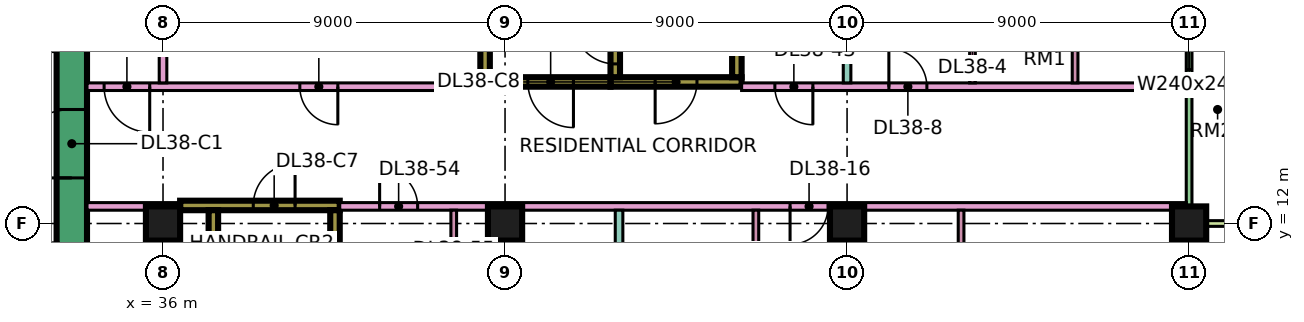
"""IFC4 building model, lengths in metres.
Left out: names, types, materials, properties, quantities, classifications, styles, units other than length and angle.
Written with IfcOpenShell. Run it as: python <this file> out.ifc"""

import sys

from ifc_helpers import new_model, si_unit, direction, frame, frame_2d, origin, origin_2d, place, context, subcontext, project, spatial, rectangle, extrude, element, fill, save


model = new_model("IFC4")
c1 = context("Model", 3, precision=1e-05, world=origin(), true_north=direction((0.0, 1.0)))
c2 = subcontext(c1, "Body", "Model", "MODEL_VIEW")
j1 = project(units=[si_unit("LENGTHUNIT", "METRE"), si_unit("PLANEANGLEUNIT", "RADIAN")], contexts=[c1])
p1 = place(None, origin())
s1 = spatial("IfcSite", under=j1, at=p1, CompositionType="ELEMENT")
p2 = place(p1, origin())
s2 = spatial("IfcBuilding", under=s1, at=p2, CompositionType="ELEMENT")
p3 = place(p2, frame((0.0, 0.0, 168.65)))
s3 = spatial("IfcBuildingStorey", under=s2, at=p3, CompositionType="ELEMENT", Elevation=168.65)
for number, where, z_axis, x_axis in (
    (1, (36.0, 12.0, 0.0), (0.0, 0.0, 1.0), (1.0, 0.0, 0.0)),
    (2, (45.0, 12.0, 0.0), (0.0, 0.0, 1.0), (1.0, 0.0, 0.0)),
    (3, (54.0, 12.0, 0.0), (0.0, 0.0, 1.0), (1.0, 0.0, 0.0)),
    (4, (63.0, 12.0, 0.0), (0.0, 0.0, 1.0), (1.0, 0.0, 0.0)),
):
    element("IfcColumn", number, at=place(p3, frame(where, z_axis=z_axis, x_axis=x_axis)), inside=s3, PredefinedType="COLUMN", context=c2, shape_type="SweptSolid", body=[
        extrude(rectangle(XDim=0.9, YDim=0.9, at=origin_2d()), origin(), (0.0, 0.0, 1.0), 3.75),
    ])
p4 = place(p3, frame((33.6, 7.8, 0.0), z_axis=(0.0, 0.0, 1.0), x_axis=(0.0, 1.0, 0.0)))
e5 = element("IfcWall", 5, at=p4, inside=s3, PredefinedType="SHEAR", context=c2, shape_type="SweptSolid", body=[
    extrude(rectangle(XDim=11.4, YDim=0.8, at=frame_2d((5.7, 0.0))), origin(), (0.0, 0.0, 1.0), 3.75),
])
p5 = place(p4, frame((5.4, 0.0, 0.0)))
e6 = element("IfcOpeningElement", 6, at=p5, cuts=e5, PredefinedType="OPENING", context=c2, shape_type="SweptSolid", body=[
    extrude(rectangle(XDim=1.8, YDim=2.4, at=frame_2d((0.9, 1.2))), frame((0.0, 0.41, 0.0), z_axis=(0.0, -1.0, 0.0), x_axis=(1.0, 0.0, 0.0)), (0.0, 0.0, 1.0), 0.82),
])
p6 = place(p3, frame((36.45, 12.475, 0.0), z_axis=(0.0, 0.0, 1.0), x_axis=(1.0, 0.0, 0.0)))
e7 = element("IfcWall", 7, at=p6, inside=s3, PredefinedType="SHEAR", context=c2, shape_type="SweptSolid", body=[
    extrude(rectangle(XDim=4.2, YDim=0.25, at=frame_2d((2.1, 0.0))), origin(), (0.0, 0.0, 1.0), 3.75),
])
p7 = place(p6, frame((1.925, 0.0, 0.0)))
e8 = element("IfcOpeningElement", 8, at=p7, cuts=e7, PredefinedType="OPENING", context=c2, shape_type="SweptSolid", body=[
    extrude(rectangle(XDim=1.1, YDim=2.2, at=frame_2d((0.55, 1.1))), frame((0.0, 0.135, 0.0), z_axis=(0.0, -1.0, 0.0), x_axis=(1.0, 0.0, 0.0)), (0.0, 0.0, 1.0), 0.27),
])
for number, where, z_axis, x_axis in (
    (9, (37.325, 5.85, 0.0), (0.0, 0.0, 1.0), (0.0, 1.0, 0.0)),
    (10, (40.525, 5.85, 0.0), (0.0, 0.0, 1.0), (0.0, 1.0, 0.0)),
):
    element("IfcWall", number, at=place(p3, frame(where, z_axis=z_axis, x_axis=x_axis)), inside=s3, PredefinedType="SHEAR", context=c2, shape_type="SweptSolid", body=[
        extrude(rectangle(XDim=6.5, YDim=0.25, at=frame_2d((3.25, 0.0))), origin(), (0.0, 0.0, 1.0), 3.75),
    ])
p8 = place(p3, frame((47.775, 15.725, 0.0), z_axis=(0.0, 0.0, 1.0), x_axis=(1.0, 0.0, 0.0)))
e11 = element("IfcWall", 11, at=p8, inside=s3, PredefinedType="SHEAR", context=c2, shape_type="SweptSolid", body=[
    extrude(rectangle(XDim=3.45, YDim=0.25, at=frame_2d((1.725, 0.0))), origin(), (0.0, 0.0, 1.0), 3.75),
])
p9 = place(p8, frame((1.175, 0.0, 0.0)))
e12 = element("IfcOpeningElement", 12, at=p9, cuts=e11, PredefinedType="OPENING", context=c2, shape_type="SweptSolid", body=[
    extrude(rectangle(XDim=1.1, YDim=2.2, at=frame_2d((0.55, 1.1))), frame((0.0, 0.135, 0.0), z_axis=(0.0, -1.0, 0.0), x_axis=(1.0, 0.0, 0.0)), (0.0, 0.0, 1.0), 0.27),
])
p10 = place(p3, frame((47.9, 15.85, 0.0), z_axis=(0.0, 0.0, 1.0), x_axis=(0.0, 1.0, 0.0)))
e13 = element("IfcWall", 13, at=p10, inside=s3, PredefinedType="SHEAR", context=c2, shape_type="SweptSolid", body=[
    extrude(rectangle(XDim=6.5, YDim=0.25, at=frame_2d((3.25, 0.0))), origin(), (0.0, 0.0, 1.0), 3.75),
])
p11 = place(p10, frame((0.35, 0.0, 0.0)))
e14 = element("IfcOpeningElement", 14, at=p11, cuts=e13, PredefinedType="OPENING", context=c2, shape_type="SweptSolid", body=[
    extrude(rectangle(XDim=1.1, YDim=2.2, at=frame_2d((0.55, 1.1))), frame((0.0, 0.135, 0.0), z_axis=(0.0, -1.0, 0.0), x_axis=(1.0, 0.0, 0.0)), (0.0, 0.0, 1.0), 0.27),
])
p12 = place(p3, frame((51.1, 15.85, 0.0), z_axis=(0.0, 0.0, 1.0), x_axis=(0.0, 1.0, 0.0)))
e15 = element("IfcWall", 15, at=p12, inside=s3, PredefinedType="SHEAR", context=c2, shape_type="SweptSolid", body=[
    extrude(rectangle(XDim=6.5, YDim=0.25, at=frame_2d((3.25, 0.0))), origin(), (0.0, 0.0, 1.0), 3.75),
])
p13 = place(p3, frame((44.35, 15.725, 0.0), z_axis=(0.0, 0.0, 1.0), x_axis=(1.0, 0.0, 0.0)))
e16 = element("IfcWall", 16, at=p13, inside=s3, PredefinedType="SHEAR", context=c2, shape_type="SweptSolid", body=[
    extrude(rectangle(XDim=3.425, YDim=0.25, at=frame_2d((1.712, 0.0))), origin(), (0.0, 0.0, 1.0), 3.75),
])
p14 = place(p13, frame((1.25, 0.0, 0.0)))
e17 = element("IfcOpeningElement", 17, at=p14, cuts=e16, PredefinedType="OPENING", context=c2, shape_type="SweptSolid", body=[
    extrude(rectangle(XDim=1.2, YDim=2.2, at=frame_2d((0.6, 1.1))), frame((0.0, 0.135, 0.0), z_axis=(0.0, -1.0, 0.0), x_axis=(1.0, 0.0, 0.0)), (0.0, 0.0, 1.0), 0.27),
])
p15 = place(p3, frame((44.475, 15.85, 0.0), z_axis=(0.0, 0.0, 1.0), x_axis=(0.0, 1.0, 0.0)))
e18 = element("IfcWall", 18, at=p15, inside=s3, PredefinedType="SHEAR", context=c2, shape_type="SweptSolid", body=[
    extrude(rectangle(XDim=6.5, YDim=0.25, at=frame_2d((3.25, 0.0))), origin(), (0.0, 0.0, 1.0), 3.75),
])
p16 = place(p15, frame((1.75, 0.0, 0.0)))
e19 = element("IfcOpeningElement", 19, at=p16, cuts=e18, PredefinedType="OPENING", context=c2, shape_type="SweptSolid", body=[
    extrude(rectangle(XDim=1.1, YDim=2.2, at=frame_2d((0.55, 1.1))), frame((0.0, 0.135, 0.0), z_axis=(0.0, -1.0, 0.0), x_axis=(1.0, 0.0, 0.0)), (0.0, 0.0, 1.0), 0.27),
])
p17 = place(p15, frame((4.3, 0.0, 0.0)))
e20 = element("IfcOpeningElement", 20, at=p17, cuts=e18, PredefinedType="OPENING", context=c2, shape_type="SweptSolid", body=[
    extrude(rectangle(XDim=1.1, YDim=2.2, at=frame_2d((0.55, 1.1))), frame((0.0, 0.135, 0.0), z_axis=(0.0, -1.0, 0.0), x_axis=(1.0, 0.0, 0.0)), (0.0, 0.0, 1.0), 0.27),
])
p18 = place(p3, frame((63.0, 12.075, 0.0), z_axis=(0.0, 0.0, 1.0), x_axis=(0.0, 1.0, 0.0)))
e21 = element("IfcWall", 21, at=p18, inside=s3, PredefinedType="SOLIDWALL", context=c2, shape_type="SweptSolid", body=[
    extrude(rectangle(XDim=10.35, YDim=0.15, at=frame_2d((5.175, 0.0))), origin(), (0.0, 0.0, 1.0), 3.35),
])
p19 = place(p18, frame((3.975, 0.0, 0.45)))
e22 = element("IfcOpeningElement", 22, at=p19, cuts=e21, PredefinedType="OPENING", context=c2, shape_type="SweptSolid", body=[
    extrude(rectangle(XDim=2.4, YDim=2.4, at=frame_2d((1.2, 1.2))), frame((0.0, 0.085, 0.0), z_axis=(0.0, -1.0, 0.0), x_axis=(1.0, 0.0, 0.0)), (0.0, 0.0, 1.0), 0.17),
])
p20 = place(p18, frame((8.587, 0.0, 0.45)))
e23 = element("IfcOpeningElement", 23, at=p20, cuts=e21, PredefinedType="OPENING", context=c2, shape_type="SweptSolid", body=[
    extrude(rectangle(XDim=1.2, YDim=2.4, at=frame_2d((0.6, 1.2))), frame((0.0, 0.085, 0.0), z_axis=(0.0, -1.0, 0.0), x_axis=(1.0, 0.0, 0.0)), (0.0, 0.0, 1.0), 0.17),
])
p21 = place(p3, frame((64.5, 12.0, 0.0), z_axis=(0.0, 0.0, 1.0), x_axis=(-1.0, 0.0, 0.0)))
e24 = element("IfcWall", 24, at=p21, inside=s3, PredefinedType="SOLIDWALL", context=c2, shape_type="SweptSolid", body=[
    extrude(rectangle(XDim=1.5, YDim=0.15, at=frame_2d((0.75, 0.0))), origin(), (0.0, 0.0, 1.0), 3.35),
])
p22 = place(p3, frame((34.0, 12.45, 0.0), z_axis=(0.0, 0.0, 1.0), x_axis=(1.0, 0.0, 0.0)))
e25 = element("IfcWall", 25, at=p22, inside=s3, PredefinedType="PARTITIONING", context=c2, shape_type="SweptSolid", body=[
    extrude(rectangle(XDim=2.451, YDim=0.2, at=frame_2d((1.226, 0.0))), origin(), (0.0, 0.0, 1.0), 3.35),
])
p23 = place(p3, frame((34.0, 15.6, 0.0), z_axis=(0.0, 0.0, 1.0), x_axis=(1.0, 0.0, 0.0)))
e26 = element("IfcWall", 26, at=p23, inside=s3, PredefinedType="PARTITIONING", context=c2, shape_type="SweptSolid", body=[
    extrude(rectangle(XDim=10.35, YDim=0.2, at=frame_2d((5.175, 0.0))), origin(), (0.0, 0.0, 1.0), 3.35),
])
p24 = place(p23, frame((5.6, 0.0, 0.0)))
e27 = element("IfcOpeningElement", 27, at=p24, cuts=e26, PredefinedType="OPENING", context=c2, shape_type="SweptSolid", body=[
    extrude(rectangle(XDim=1.0, YDim=2.1, at=frame_2d((0.5, 1.05))), frame((0.0, 0.11, 0.0), z_axis=(0.0, -1.0, 0.0), x_axis=(1.0, 0.0, 0.0)), (0.0, 0.0, 1.0), 0.22),
])
p25 = place(p23, frame((0.45, 0.0, 0.0)))
e28 = element("IfcOpeningElement", 28, at=p25, cuts=e26, PredefinedType="OPENING", context=c2, shape_type="SweptSolid", body=[
    extrude(rectangle(XDim=1.2, YDim=2.1, at=frame_2d((0.6, 1.05))), frame((0.0, 0.11, 0.0), z_axis=(0.0, -1.0, 0.0), x_axis=(1.0, 0.0, 0.0)), (0.0, 0.0, 1.0), 0.22),
])
p26 = place(p3, frame((36.0, 15.7, 0.0), z_axis=(0.0, 0.0, 1.0), x_axis=(0.0, 1.0, 0.0)))
e29 = element("IfcWall", 29, at=p26, inside=s3, PredefinedType="PARTITIONING", context=c2, shape_type="SweptSolid", body=[
    extrude(rectangle(XDim=8.3, YDim=0.2, at=frame_2d((4.15, 0.0))), origin(), (0.0, 0.0, 1.0), 3.35),
])
p27 = place(p3, frame((40.65, 12.45, 0.0), z_axis=(0.0, 0.0, 1.0), x_axis=(1.0, 0.0, 0.0)))
e30 = element("IfcWall", 30, at=p27, inside=s3, PredefinedType="PARTITIONING", context=c2, shape_type="SweptSolid", body=[
    extrude(rectangle(XDim=22.276, YDim=0.2, at=frame_2d((11.138, 0.0))), origin(), (0.0, 0.0, 1.0), 3.35),
])
p28 = place(p27, frame((11.85, 0.0, 0.0)))
e31 = element("IfcOpeningElement", 31, at=p28, cuts=e30, PredefinedType="OPENING", context=c2, shape_type="SweptSolid", body=[
    extrude(rectangle(XDim=1.0, YDim=2.1, at=frame_2d((0.5, 1.05))), frame((0.0, 0.11, 0.0), z_axis=(0.0, -1.0, 0.0), x_axis=(1.0, 0.0, 0.0)), (0.0, 0.0, 1.0), 0.22),
])
p29 = place(p27, frame((1.05, 0.0, 0.0)))
e32 = element("IfcOpeningElement", 32, at=p29, cuts=e30, PredefinedType="OPENING", context=c2, shape_type="SweptSolid", body=[
    extrude(rectangle(XDim=1.0, YDim=2.1, at=frame_2d((0.5, 1.05))), frame((0.0, 0.11, 0.0), z_axis=(0.0, -1.0, 0.0), x_axis=(1.0, 0.0, 0.0)), (0.0, 0.0, 1.0), 0.22),
])
p30 = place(p3, frame((43.65, 5.825, 0.0), z_axis=(0.0, 0.0, 1.0), x_axis=(0.0, 1.0, 0.0)))
e33 = element("IfcWall", 33, at=p30, inside=s3, PredefinedType="PARTITIONING", context=c2, shape_type="SweptSolid", body=[
    extrude(rectangle(XDim=6.525, YDim=0.15, at=frame_2d((3.263, 0.0))), origin(), (0.0, 0.0, 1.0), 3.35),
])
p31 = place(p30, frame((4.425, 0.0, 0.0)))
e34 = element("IfcOpeningElement", 34, at=p31, cuts=e33, PredefinedType="OPENING", context=c2, shape_type="SweptSolid", body=[
    extrude(rectangle(XDim=0.9, YDim=2.1, at=frame_2d((0.45, 1.05))), frame((0.0, 0.085, 0.0), z_axis=(0.0, -1.0, 0.0), x_axis=(1.0, 0.0, 0.0)), (0.0, 0.0, 1.0), 0.17),
])
p32 = place(p3, frame((48.0, 0.0, 0.0), z_axis=(0.0, 0.0, 1.0), x_axis=(0.0, 1.0, 0.0)))
e35 = element("IfcWall", 35, at=p32, inside=s3, PredefinedType="PARTITIONING", context=c2, shape_type="SweptSolid", body=[
    extrude(rectangle(XDim=12.35, YDim=0.2, at=frame_2d((6.175, 0.0))), origin(), (0.0, 0.0, 1.0), 3.35),
])
p33 = place(p3, frame((51.225, 15.6, 0.0), z_axis=(0.0, 0.0, 1.0), x_axis=(1.0, 0.0, 0.0)))
e36 = element("IfcWall", 36, at=p33, inside=s3, PredefinedType="PARTITIONING", context=c2, shape_type="SweptSolid", body=[
    extrude(rectangle(XDim=11.701, YDim=0.2, at=frame_2d((5.851, 0.0))), origin(), (0.0, 0.0, 1.0), 3.35),
])
p34 = place(p33, frame((3.875, 0.0, 0.0)))
e37 = element("IfcOpeningElement", 37, at=p34, cuts=e36, PredefinedType="OPENING", context=c2, shape_type="SweptSolid", body=[
    extrude(rectangle(XDim=1.0, YDim=2.1, at=frame_2d((0.5, 1.05))), frame((0.0, 0.11, 0.0), z_axis=(0.0, -1.0, 0.0), x_axis=(1.0, 0.0, 0.0)), (0.0, 0.0, 1.0), 0.22),
])
p35 = place(p33, frame((0.875, 0.0, 0.0)))
e38 = element("IfcOpeningElement", 38, at=p35, cuts=e36, PredefinedType="OPENING", context=c2, shape_type="SweptSolid", body=[
    extrude(rectangle(XDim=1.0, YDim=2.1, at=frame_2d((0.5, 1.05))), frame((0.0, 0.11, 0.0), z_axis=(0.0, -1.0, 0.0), x_axis=(1.0, 0.0, 0.0)), (0.0, 0.0, 1.0), 0.22),
])
p36 = place(p3, frame((51.6, 7.575, 0.0), z_axis=(0.0, 0.0, 1.0), x_axis=(0.0, 1.0, 0.0)))
e39 = element("IfcWall", 39, at=p36, inside=s3, PredefinedType="PARTITIONING", context=c2, shape_type="SweptSolid", body=[
    extrude(rectangle(XDim=4.775, YDim=0.15, at=frame_2d((2.388, 0.0))), origin(), (0.0, 0.0, 1.0), 3.35),
])
p37 = place(p36, frame((2.125, 0.0, 0.0)))
e40 = element("IfcOpeningElement", 40, at=p37, cuts=e39, PredefinedType="OPENING", context=c2, shape_type="SweptSolid", body=[
    extrude(rectangle(XDim=0.8, YDim=2.1, at=frame_2d((0.4, 1.05))), frame((0.0, 0.085, 0.0), z_axis=(0.0, -1.0, 0.0), x_axis=(1.0, 0.0, 0.0)), (0.0, 0.0, 1.0), 0.17),
])
p38 = place(p3, frame((54.0, 15.7, 0.0), z_axis=(0.0, 0.0, 1.0), x_axis=(0.0, 1.0, 0.0)))
e41 = element("IfcWall", 41, at=p38, inside=s3, PredefinedType="PARTITIONING", context=c2, shape_type="SweptSolid", body=[
    extrude(rectangle(XDim=8.3, YDim=0.2, at=frame_2d((4.15, 0.0))), origin(), (0.0, 0.0, 1.0), 3.35),
])
p39 = place(p3, frame((54.3, 7.725, 0.0), z_axis=(0.0, 0.0, 1.0), x_axis=(0.0, 1.0, 0.0)))
e42 = element("IfcWall", 42, at=p39, inside=s3, PredefinedType="PARTITIONING", context=c2, shape_type="SweptSolid", body=[
    extrude(rectangle(XDim=4.625, YDim=0.15, at=frame_2d((2.312, 0.0))), origin(), (0.0, 0.0, 1.0), 3.35),
])
p40 = place(p39, frame((1.875, 0.0, 0.0)))
e43 = element("IfcOpeningElement", 43, at=p40, cuts=e42, PredefinedType="OPENING", context=c2, shape_type="SweptSolid", body=[
    extrude(rectangle(XDim=0.8, YDim=2.1, at=frame_2d((0.4, 1.05))), frame((0.0, 0.085, 0.0), z_axis=(0.0, -1.0, 0.0), x_axis=(1.0, 0.0, 0.0)), (0.0, 0.0, 1.0), 0.17),
])
p41 = place(p3, frame((57.0, 7.725, 0.0), z_axis=(0.0, 0.0, 1.0), x_axis=(0.0, 1.0, 0.0)))
e44 = element("IfcWall", 44, at=p41, inside=s3, PredefinedType="PARTITIONING", context=c2, shape_type="SweptSolid", body=[
    extrude(rectangle(XDim=4.625, YDim=0.15, at=frame_2d((2.312, 0.0))), origin(), (0.0, 0.0, 1.0), 3.35),
])
p42 = place(p3, frame((57.3, 15.7, 0.0), z_axis=(0.0, 0.0, 1.0), x_axis=(0.0, 1.0, 0.0)))
e45 = element("IfcWall", 45, at=p42, inside=s3, PredefinedType="PARTITIONING", context=c2, shape_type="SweptSolid", body=[
    extrude(rectangle(XDim=3.125, YDim=0.15, at=frame_2d((1.562, 0.0))), origin(), (0.0, 0.0, 1.0), 3.35),
])
p43 = place(p42, frame((1.1, 0.0, 0.0)))
e46 = element("IfcOpeningElement", 46, at=p43, cuts=e45, PredefinedType="OPENING", context=c2, shape_type="SweptSolid", body=[
    extrude(rectangle(XDim=0.8, YDim=2.1, at=frame_2d((0.4, 1.05))), frame((0.0, 0.085, 0.0), z_axis=(0.0, -1.0, 0.0), x_axis=(1.0, 0.0, 0.0)), (0.0, 0.0, 1.0), 0.17),
])
p44 = place(p3, frame((60.0, 15.7, 0.0), z_axis=(0.0, 0.0, 1.0), x_axis=(0.0, 1.0, 0.0)))
e47 = element("IfcWall", 47, at=p44, inside=s3, PredefinedType="PARTITIONING", context=c2, shape_type="SweptSolid", body=[
    extrude(rectangle(XDim=3.125, YDim=0.15, at=frame_2d((1.562, 0.0))), origin(), (0.0, 0.0, 1.0), 3.35),
])
p45 = place(p19, origin())
e48 = element("IfcWindow", 48, at=p45, inside=s3, PartitioningType="SINGLE_PANEL", PredefinedType="WINDOW", context=c2, shape_type="SweptSolid", body=[
    extrude(rectangle(XDim=2.4, YDim=2.4, at=frame_2d((1.2, 1.2))), frame((0.0, 0.03, 0.0), z_axis=(0.0, -1.0, 0.0), x_axis=(1.0, 0.0, 0.0)), (0.0, 0.0, 1.0), 0.06),
])
fill(e22, e48)
p46 = place(p5, origin())
e49 = element("IfcDoor", 49, at=p46, inside=s3, OperationType="DOUBLE_DOOR_SINGLE_SWING", PredefinedType="DOOR", context=c2, shape_type="SweptSolid", body=[
    extrude(rectangle(XDim=1.8, YDim=2.4, at=frame_2d((0.9, 1.2))), frame((0.0, 0.025, 0.0), z_axis=(0.0, -1.0, 0.0), x_axis=(1.0, 0.0, 0.0)), (0.0, 0.0, 1.0), 0.05),
])
fill(e6, e49)
p47 = place(p7, frame((1.1, 0.0, 0.0), z_axis=(0.0, 0.0, 1.0), x_axis=(-1.0, 0.0, 0.0)))
e50 = element("IfcDoor", 50, at=p47, inside=s3, OperationType="SINGLE_SWING_RIGHT", PredefinedType="DOOR", context=c2, shape_type="SweptSolid", body=[
    extrude(rectangle(XDim=1.1, YDim=2.2, at=frame_2d((0.55, 1.1))), frame((0.0, 0.025, 0.0), z_axis=(0.0, -1.0, 0.0), x_axis=(1.0, 0.0, 0.0)), (0.0, 0.0, 1.0), 0.05),
])
fill(e8, e50)
p48 = place(p9, frame((1.1, 0.0, 0.0), z_axis=(0.0, 0.0, 1.0), x_axis=(-1.0, 0.0, 0.0)))
e51 = element("IfcDoor", 51, at=p48, inside=s3, OperationType="SINGLE_SWING_LEFT", PredefinedType="DOOR", context=c2, shape_type="SweptSolid", body=[
    extrude(rectangle(XDim=1.1, YDim=2.2, at=frame_2d((0.55, 1.1))), frame((0.0, 0.025, 0.0), z_axis=(0.0, -1.0, 0.0), x_axis=(1.0, 0.0, 0.0)), (0.0, 0.0, 1.0), 0.05),
])
fill(e12, e51)
p49 = place(p14, origin())
e52 = element("IfcDoor", 52, at=p49, inside=s3, OperationType="SINGLE_SWING_RIGHT", PredefinedType="DOOR", context=c2, shape_type="SweptSolid", body=[
    extrude(rectangle(XDim=1.2, YDim=2.2, at=frame_2d((0.6, 1.1))), frame((0.0, 0.025, 0.0), z_axis=(0.0, -1.0, 0.0), x_axis=(1.0, 0.0, 0.0)), (0.0, 0.0, 1.0), 0.05),
])
fill(e17, e52)
p50 = place(p11, frame((1.1, 0.0, 0.0), z_axis=(0.0, 0.0, 1.0), x_axis=(-1.0, 0.0, 0.0)))
e53 = element("IfcDoor", 53, at=p50, inside=s3, OperationType="SINGLE_SWING_RIGHT", PredefinedType="DOOR", context=c2, shape_type="SweptSolid", body=[
    extrude(rectangle(XDim=1.1, YDim=2.2, at=frame_2d((0.55, 1.1))), frame((0.0, 0.025, 0.0), z_axis=(0.0, -1.0, 0.0), x_axis=(1.0, 0.0, 0.0)), (0.0, 0.0, 1.0), 0.05),
])
fill(e14, e53)
p51 = place(p24, origin())
e54 = element("IfcDoor", 54, at=p51, inside=s3, OperationType="SINGLE_SWING_RIGHT", PredefinedType="DOOR", context=c2, shape_type="SweptSolid", body=[
    extrude(rectangle(XDim=1.0, YDim=2.1, at=frame_2d((0.5, 1.05))), frame((0.0, 0.025, 0.0), z_axis=(0.0, -1.0, 0.0), x_axis=(1.0, 0.0, 0.0)), (0.0, 0.0, 1.0), 0.05),
])
fill(e27, e54)
p52 = place(p34, origin())
e55 = element("IfcDoor", 55, at=p52, inside=s3, OperationType="SINGLE_SWING_LEFT", PredefinedType="DOOR", context=c2, shape_type="SweptSolid", body=[
    extrude(rectangle(XDim=1.0, YDim=2.1, at=frame_2d((0.5, 1.05))), frame((0.0, 0.025, 0.0), z_axis=(0.0, -1.0, 0.0), x_axis=(1.0, 0.0, 0.0)), (0.0, 0.0, 1.0), 0.05),
])
fill(e37, e55)
p53 = place(p28, frame((1.0, 0.0, 0.0), z_axis=(0.0, 0.0, 1.0), x_axis=(-1.0, 0.0, 0.0)))
e56 = element("IfcDoor", 56, at=p53, inside=s3, OperationType="SINGLE_SWING_LEFT", PredefinedType="DOOR", context=c2, shape_type="SweptSolid", body=[
    extrude(rectangle(XDim=1.0, YDim=2.1, at=frame_2d((0.5, 1.05))), frame((0.0, 0.025, 0.0), z_axis=(0.0, -1.0, 0.0), x_axis=(1.0, 0.0, 0.0)), (0.0, 0.0, 1.0), 0.05),
])
fill(e31, e56)
p54 = place(p25, origin())
e57 = element("IfcDoor", 57, at=p54, inside=s3, OperationType="SINGLE_SWING_RIGHT", PredefinedType="DOOR", context=c2, shape_type="SweptSolid", body=[
    extrude(rectangle(XDim=1.2, YDim=2.1, at=frame_2d((0.6, 1.05))), frame((0.0, 0.025, 0.0), z_axis=(0.0, -1.0, 0.0), x_axis=(1.0, 0.0, 0.0)), (0.0, 0.0, 1.0), 0.05),
])
fill(e28, e57)
p55 = place(p35, origin())
e58 = element("IfcDoor", 58, at=p55, inside=s3, OperationType="SINGLE_SWING_RIGHT", PredefinedType="DOOR", context=c2, shape_type="SweptSolid", body=[
    extrude(rectangle(XDim=1.0, YDim=2.1, at=frame_2d((0.5, 1.05))), frame((0.0, 0.025, 0.0), z_axis=(0.0, -1.0, 0.0), x_axis=(1.0, 0.0, 0.0)), (0.0, 0.0, 1.0), 0.05),
])
fill(e38, e58)
p56 = place(p29, origin())
e59 = element("IfcDoor", 59, at=p56, inside=s3, OperationType="SINGLE_SWING_LEFT", PredefinedType="DOOR", context=c2, shape_type="SweptSolid", body=[
    extrude(rectangle(XDim=1.0, YDim=2.1, at=frame_2d((0.5, 1.05))), frame((0.0, 0.025, 0.0), z_axis=(0.0, -1.0, 0.0), x_axis=(1.0, 0.0, 0.0)), (0.0, 0.0, 1.0), 0.05),
])
fill(e32, e59)
save(model, sys.argv[1])
